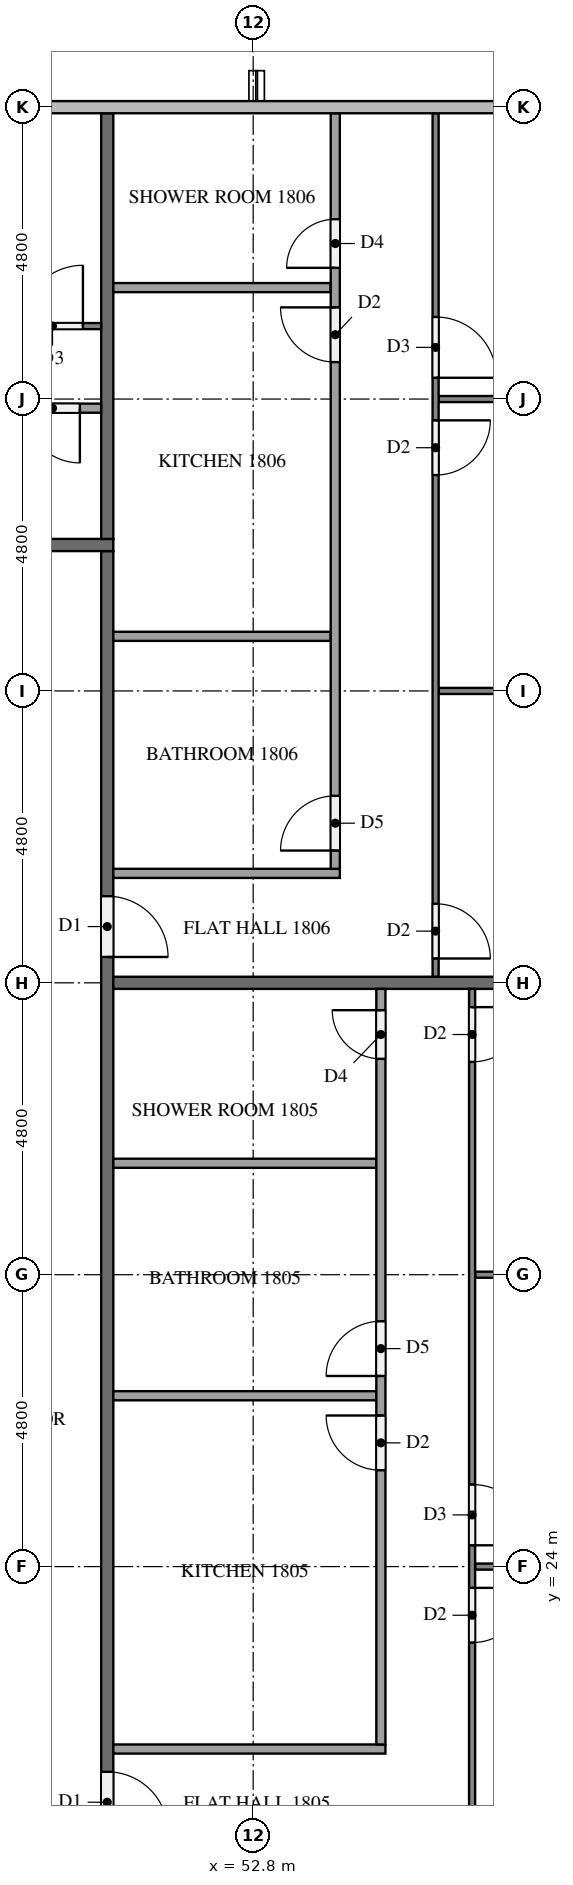
"""IFC4 building model, lengths in metres.
Left out: names, types, materials, properties, quantities, classifications, styles, units other than length and angle.
Written with IfcOpenShell. Run it as: python <this file> out.ifc"""

import sys

from ifc_helpers import new_model, si_unit, direction, frame, frame_2d, origin, place, context, subcontext, project, spatial, rectangle, extrude, element, fill, save


model = new_model("IFC4")
c1 = context("Model", 3, precision=1e-05, world=origin(), true_north=direction((0.0, 1.0)))
c2 = subcontext(c1, "Body", "Model", "MODEL_VIEW")
j1 = project(units=[si_unit("LENGTHUNIT", "METRE"), si_unit("PLANEANGLEUNIT", "RADIAN")], contexts=[c1])
p1 = place(None, origin())
s1 = spatial("IfcSite", under=j1, at=p1, CompositionType="ELEMENT")
p2 = place(p1, origin())
s2 = spatial("IfcBuilding", under=s1, at=p2, CompositionType="ELEMENT")
p3 = place(p2, frame((0.0, 0.0, 73.3)))
s3 = spatial("IfcBuildingStorey", under=s2, at=p3, CompositionType="ELEMENT", Elevation=73.3)
p4 = place(p3, frame((50.4, 40.7, 0.0), z_axis=(0.0, 0.0, 1.0), x_axis=(0.0, -1.0, 0.0)))
e1 = element("IfcWall", 1, at=p4, inside=s3, PredefinedType="PARTITIONING", context=c2, shape_type="SweptSolid", body=[
    extrude(rectangle(XDim=28.6, YDim=0.2, at=frame_2d((14.3, 0.0))), origin(), (0.0, 0.0, 1.0), 3.2),
])
p5 = place(p4, frame((21.875, 0.0, 0.0)))
e2 = element("IfcOpeningElement", 2, at=p5, cuts=e1, PredefinedType="OPENING", context=c2, shape_type="SweptSolid", body=[
    extrude(rectangle(XDim=1.1, YDim=2.1, at=frame_2d((0.55, 1.05))), frame((0.0, 0.11, 0.0), z_axis=(0.0, -1.0, 0.0), x_axis=(1.0, 0.0, 0.0)), (0.0, 0.0, 1.0), 0.22),
])
p6 = place(p4, frame((20.075, 0.0, 0.0)))
e3 = element("IfcOpeningElement", 3, at=p6, cuts=e1, PredefinedType="OPENING", context=c2, shape_type="SweptSolid", body=[
    extrude(rectangle(XDim=1.0, YDim=2.1, at=frame_2d((0.5, 1.05))), frame((0.0, 0.11, 0.0), z_axis=(0.0, -1.0, 0.0), x_axis=(1.0, 0.0, 0.0)), (0.0, 0.0, 1.0), 0.22),
])
p7 = place(p4, frame((5.675, 0.0, 0.0)))
e4 = element("IfcOpeningElement", 4, at=p7, cuts=e1, PredefinedType="OPENING", context=c2, shape_type="SweptSolid", body=[
    extrude(rectangle(XDim=1.0, YDim=2.1, at=frame_2d((0.5, 1.05))), frame((0.0, 0.11, 0.0), z_axis=(0.0, -1.0, 0.0), x_axis=(1.0, 0.0, 0.0)), (0.0, 0.0, 1.0), 0.22),
])
p8 = place(p3, frame((11.9, 40.8, 0.0), z_axis=(0.0, 0.0, 1.0), x_axis=(1.0, 0.0, 0.0)))
e5 = element("IfcWall", 5, at=p8, inside=s3, PredefinedType="PARTITIONING", context=c2, shape_type="SweptSolid", body=[
    extrude(rectangle(XDim=38.6, YDim=0.2, at=frame_2d((19.3, 0.0))), origin(), (0.0, 0.0, 1.0), 3.2),
])
p9 = place(p8, frame((22.125, 0.0, 0.0)))
e6 = element("IfcOpeningElement", 6, at=p9, cuts=e5, PredefinedType="OPENING", context=c2, shape_type="SweptSolid", body=[
    extrude(rectangle(XDim=1.0, YDim=2.1, at=frame_2d((0.5, 1.05))), frame((0.0, 0.11, 0.0), z_axis=(0.0, -1.0, 0.0), x_axis=(1.0, 0.0, 0.0)), (0.0, 0.0, 1.0), 0.22),
])
p10 = place(p8, frame((7.725, 0.0, 0.0)))
e7 = element("IfcOpeningElement", 7, at=p10, cuts=e5, PredefinedType="OPENING", context=c2, shape_type="SweptSolid", body=[
    extrude(rectangle(XDim=1.0, YDim=2.1, at=frame_2d((0.5, 1.05))), frame((0.0, 0.11, 0.0), z_axis=(0.0, -1.0, 0.0), x_axis=(1.0, 0.0, 0.0)), (0.0, 0.0, 1.0), 0.22),
])
p11 = place(p8, frame((5.875, 0.0, 0.0)))
e8 = element("IfcOpeningElement", 8, at=p11, cuts=e5, PredefinedType="OPENING", context=c2, shape_type="SweptSolid", body=[
    extrude(rectangle(XDim=1.0, YDim=2.1, at=frame_2d((0.5, 1.05))), frame((0.0, 0.11, 0.0), z_axis=(0.0, -1.0, 0.0), x_axis=(1.0, 0.0, 0.0)), (0.0, 0.0, 1.0), 0.22),
])
p12 = place(p3, frame((50.5, 33.6, 0.0), z_axis=(0.0, 0.0, 1.0), x_axis=(1.0, 0.0, 0.0)))
e9 = element("IfcWall", 9, at=p12, inside=s3, PredefinedType="PARTITIONING", context=c2, shape_type="SweptSolid", body=[
    extrude(rectangle(XDim=11.475, YDim=0.2, at=frame_2d((5.738, 0.0))), origin(), (0.0, 0.0, 1.0), 3.2),
])
p13 = place(p3, frame((50.4, 40.9, 0.0), z_axis=(0.0, 0.0, 1.0), x_axis=(0.0, 1.0, 0.0)))
e10 = element("IfcWall", 10, at=p13, inside=s3, PredefinedType="PARTITIONING", context=c2, shape_type="SweptSolid", body=[
    extrude(rectangle(XDim=7.0, YDim=0.2, at=frame_2d((3.5, 0.0))), origin(), (0.0, 0.0, 1.0), 3.2),
])
p14 = place(p3, frame((56.45, 24.0, 0.0), z_axis=(0.0, 0.0, 1.0), x_axis=(1.0, 0.0, 0.0)))
e11 = element("IfcWall", 11, at=p14, inside=s3, PredefinedType="PARTITIONING", context=c2, shape_type="SweptSolid", body=[
    extrude(rectangle(XDim=5.525, YDim=0.1, at=frame_2d((2.763, 0.0))), origin(), (0.0, 0.0, 1.0), 3.2),
])
p15 = place(p3, frame((56.45, 28.8, 0.0), z_axis=(0.0, 0.0, 1.0), x_axis=(1.0, 0.0, 0.0)))
e12 = element("IfcWall", 12, at=p15, inside=s3, PredefinedType="PARTITIONING", context=c2, shape_type="SweptSolid", body=[
    extrude(rectangle(XDim=5.85, YDim=0.1, at=frame_2d((2.925, 0.0))), origin(), (0.0, 0.0, 1.0), 3.2),
])
p16 = place(p3, frame((56.4, 33.5, 0.0), z_axis=(0.0, 0.0, 1.0), x_axis=(0.0, -1.0, 0.0)))
e13 = element("IfcWall", 13, at=p16, inside=s3, PredefinedType="PARTITIONING", context=c2, shape_type="SweptSolid", body=[
    extrude(rectangle(XDim=14.2, YDim=0.1, at=frame_2d((7.1, 0.0))), origin(), (0.0, 0.0, 1.0), 3.2),
])
p17 = place(p16, frame((9.85, 0.0, 0.0)))
e14 = element("IfcOpeningElement", 14, at=p17, cuts=e13, PredefinedType="OPENING", context=c2, shape_type="SweptSolid", body=[
    extrude(rectangle(XDim=0.9, YDim=2.1, at=frame_2d((0.45, 1.05))), frame((0.0, 0.06, 0.0), z_axis=(0.0, -1.0, 0.0), x_axis=(1.0, 0.0, 0.0)), (0.0, 0.0, 1.0), 0.12),
])
p18 = place(p16, frame((8.15, 0.0, 0.0)))
e15 = element("IfcOpeningElement", 15, at=p18, cuts=e13, PredefinedType="OPENING", context=c2, shape_type="SweptSolid", body=[
    extrude(rectangle(XDim=1.0, YDim=2.1, at=frame_2d((0.5, 1.05))), frame((0.0, 0.06, 0.0), z_axis=(0.0, -1.0, 0.0), x_axis=(1.0, 0.0, 0.0)), (0.0, 0.0, 1.0), 0.12),
])
p19 = place(p16, frame((0.3, 0.0, 0.0)))
e16 = element("IfcOpeningElement", 16, at=p19, cuts=e13, PredefinedType="OPENING", context=c2, shape_type="SweptSolid", body=[
    extrude(rectangle(XDim=0.9, YDim=2.1, at=frame_2d((0.45, 1.05))), frame((0.0, 0.06, 0.0), z_axis=(0.0, -1.0, 0.0), x_axis=(1.0, 0.0, 0.0)), (0.0, 0.0, 1.0), 0.12),
])
for number, where, z_axis, x_axis in (
    (17, (50.5, 26.81, 0.0), (0.0, 0.0, 1.0), (1.0, 0.0, 0.0)),
    (18, (50.5, 30.633, 0.0), (0.0, 0.0, 1.0), (1.0, 0.0, 0.0)),
):
    element("IfcWall", number, at=place(p3, frame(where, z_axis=z_axis, x_axis=x_axis)), inside=s3, PredefinedType="PARTITIONING", context=c2, shape_type="SweptSolid", body=[
        extrude(rectangle(XDim=4.325, YDim=0.15, at=frame_2d((2.163, 0.0))), origin(), (0.0, 0.0, 1.0), 3.2),
    ])
p20 = place(p3, frame((50.5, 21.0, 0.0), z_axis=(0.0, 0.0, 1.0), x_axis=(1.0, 0.0, 0.0)))
e19 = element("IfcWall", 19, at=p20, inside=s3, PredefinedType="PARTITIONING", context=c2, shape_type="SweptSolid", body=[
    extrude(rectangle(XDim=4.475, YDim=0.15, at=frame_2d((2.238, 0.0))), origin(), (0.0, 0.0, 1.0), 3.2),
])
p21 = place(p3, frame((54.9, 21.075, 0.0), z_axis=(0.0, 0.0, 1.0), x_axis=(0.0, 1.0, 0.0)))
e20 = element("IfcWall", 20, at=p21, inside=s3, PredefinedType="PARTITIONING", context=c2, shape_type="SweptSolid", body=[
    extrude(rectangle(XDim=12.425, YDim=0.15, at=frame_2d((6.212, 0.0))), origin(), (0.0, 0.0, 1.0), 3.2),
])
p22 = place(p21, frame((4.51, 0.0, 0.0)))
e21 = element("IfcOpeningElement", 21, at=p22, cuts=e20, PredefinedType="OPENING", context=c2, shape_type="SweptSolid", body=[
    extrude(rectangle(XDim=0.9, YDim=2.1, at=frame_2d((0.45, 1.05))), frame((0.0, 0.085, 0.0), z_axis=(0.0, -1.0, 0.0), x_axis=(1.0, 0.0, 0.0)), (0.0, 0.0, 1.0), 0.17),
])
p23 = place(p21, frame((6.06, 0.0, 0.0)))
e22 = element("IfcOpeningElement", 22, at=p23, cuts=e20, PredefinedType="OPENING", context=c2, shape_type="SweptSolid", body=[
    extrude(rectangle(XDim=0.9, YDim=2.1, at=frame_2d((0.45, 1.05))), frame((0.0, 0.085, 0.0), z_axis=(0.0, -1.0, 0.0), x_axis=(1.0, 0.0, 0.0)), (0.0, 0.0, 1.0), 0.17),
])
p24 = place(p21, frame((11.275, 0.0, 0.0)))
e23 = element("IfcOpeningElement", 23, at=p24, cuts=e20, PredefinedType="OPENING", context=c2, shape_type="SweptSolid", body=[
    extrude(rectangle(XDim=0.8, YDim=2.1, at=frame_2d((0.4, 1.05))), frame((0.0, 0.085, 0.0), z_axis=(0.0, -1.0, 0.0), x_axis=(1.0, 0.0, 0.0)), (0.0, 0.0, 1.0), 0.17),
])
p25 = place(p3, frame((55.85, 38.4, 0.0), z_axis=(0.0, 0.0, 1.0), x_axis=(1.0, 0.0, 0.0)))
e24 = element("IfcWall", 24, at=p25, inside=s3, PredefinedType="PARTITIONING", context=c2, shape_type="SweptSolid", body=[
    extrude(rectangle(XDim=6.45, YDim=0.1, at=frame_2d((3.225, 0.0))), origin(), (0.0, 0.0, 1.0), 3.2),
])
p26 = place(p3, frame((55.85, 43.2, 0.0), z_axis=(0.0, 0.0, 1.0), x_axis=(1.0, 0.0, 0.0)))
e25 = element("IfcWall", 25, at=p26, inside=s3, PredefinedType="PARTITIONING", context=c2, shape_type="SweptSolid", body=[
    extrude(rectangle(XDim=5.975, YDim=0.1, at=frame_2d((2.987, 0.0))), origin(), (0.0, 0.0, 1.0), 3.2),
])
p27 = place(p3, frame((55.8, 47.9, 0.0), z_axis=(0.0, 0.0, 1.0), x_axis=(0.0, -1.0, 0.0)))
e26 = element("IfcWall", 26, at=p27, inside=s3, PredefinedType="PARTITIONING", context=c2, shape_type="SweptSolid", body=[
    extrude(rectangle(XDim=14.2, YDim=0.1, at=frame_2d((7.1, 0.0))), origin(), (0.0, 0.0, 1.0), 3.2),
])
p28 = place(p27, frame((13.0, 0.0, 0.0)))
e27 = element("IfcOpeningElement", 27, at=p28, cuts=e26, PredefinedType="OPENING", context=c2, shape_type="SweptSolid", body=[
    extrude(rectangle(XDim=0.9, YDim=2.1, at=frame_2d((0.45, 1.05))), frame((0.0, 0.06, 0.0), z_axis=(0.0, -1.0, 0.0), x_axis=(1.0, 0.0, 0.0)), (0.0, 0.0, 1.0), 0.12),
])
p29 = place(p27, frame((5.05, 0.0, 0.0)))
e28 = element("IfcOpeningElement", 28, at=p29, cuts=e26, PredefinedType="OPENING", context=c2, shape_type="SweptSolid", body=[
    extrude(rectangle(XDim=0.9, YDim=2.1, at=frame_2d((0.45, 1.05))), frame((0.0, 0.06, 0.0), z_axis=(0.0, -1.0, 0.0), x_axis=(1.0, 0.0, 0.0)), (0.0, 0.0, 1.0), 0.12),
])
p30 = place(p27, frame((3.35, 0.0, 0.0)))
e29 = element("IfcOpeningElement", 29, at=p30, cuts=e26, PredefinedType="OPENING", context=c2, shape_type="SweptSolid", body=[
    extrude(rectangle(XDim=1.0, YDim=2.1, at=frame_2d((0.5, 1.05))), frame((0.0, 0.06, 0.0), z_axis=(0.0, -1.0, 0.0), x_axis=(1.0, 0.0, 0.0)), (0.0, 0.0, 1.0), 0.12),
])
for number, where, z_axis, x_axis in (
    (30, (50.5, 39.298, 0.0), (0.0, 0.0, 1.0), (1.0, 0.0, 0.0)),
    (31, (50.5, 45.033, 0.0), (0.0, 0.0, 1.0), (1.0, 0.0, 0.0)),
):
    element("IfcWall", number, at=place(p3, frame(where, z_axis=z_axis, x_axis=x_axis)), inside=s3, PredefinedType="PARTITIONING", context=c2, shape_type="SweptSolid", body=[
        extrude(rectangle(XDim=3.575, YDim=0.15, at=frame_2d((1.788, 0.0))), origin(), (0.0, 0.0, 1.0), 3.2),
    ])
p31 = place(p3, frame((50.5, 35.4, 0.0), z_axis=(0.0, 0.0, 1.0), x_axis=(1.0, 0.0, 0.0)))
e32 = element("IfcWall", 32, at=p31, inside=s3, PredefinedType="PARTITIONING", context=c2, shape_type="SweptSolid", body=[
    extrude(rectangle(XDim=3.725, YDim=0.15, at=frame_2d((1.863, 0.0))), origin(), (0.0, 0.0, 1.0), 3.2),
])
p32 = place(p3, frame((54.15, 35.475, 0.0), z_axis=(0.0, 0.0, 1.0), x_axis=(0.0, 1.0, 0.0)))
e33 = element("IfcWall", 33, at=p32, inside=s3, PredefinedType="PARTITIONING", context=c2, shape_type="SweptSolid", body=[
    extrude(rectangle(XDim=12.425, YDim=0.15, at=frame_2d((6.212, 0.0))), origin(), (0.0, 0.0, 1.0), 3.2),
])
p33 = place(p32, frame((0.3, 0.0, 0.0)))
e34 = element("IfcOpeningElement", 34, at=p33, cuts=e33, PredefinedType="OPENING", context=c2, shape_type="SweptSolid", body=[
    extrude(rectangle(XDim=0.9, YDim=2.1, at=frame_2d((0.45, 1.05))), frame((0.0, 0.085, 0.0), z_axis=(0.0, -1.0, 0.0), x_axis=(1.0, 0.0, 0.0)), (0.0, 0.0, 1.0), 0.17),
])
p34 = place(p32, frame((8.333, 0.0, 0.0)))
e35 = element("IfcOpeningElement", 35, at=p34, cuts=e33, PredefinedType="OPENING", context=c2, shape_type="SweptSolid", body=[
    extrude(rectangle(XDim=0.9, YDim=2.1, at=frame_2d((0.45, 1.05))), frame((0.0, 0.085, 0.0), z_axis=(0.0, -1.0, 0.0), x_axis=(1.0, 0.0, 0.0)), (0.0, 0.0, 1.0), 0.17),
])
p35 = place(p32, frame((9.883, 0.0, 0.0)))
e36 = element("IfcOpeningElement", 36, at=p35, cuts=e33, PredefinedType="OPENING", context=c2, shape_type="SweptSolid", body=[
    extrude(rectangle(XDim=0.8, YDim=2.1, at=frame_2d((0.4, 1.05))), frame((0.0, 0.085, 0.0), z_axis=(0.0, -1.0, 0.0), x_axis=(1.0, 0.0, 0.0)), (0.0, 0.0, 1.0), 0.17),
])
p36 = place(p3, frame((33.7, 44.4, 0.0), z_axis=(0.0, 0.0, 1.0), x_axis=(1.0, 0.0, 0.0)))
e37 = element("IfcWall", 37, at=p36, inside=s3, PredefinedType="PARTITIONING", context=c2, shape_type="SweptSolid", body=[
    extrude(rectangle(XDim=16.6, YDim=0.1, at=frame_2d((8.3, 0.0))), origin(), (0.0, 0.0, 1.0), 3.2),
])
p37 = place(p36, frame((3.45, 0.0, 0.0)))
e38 = element("IfcOpeningElement", 38, at=p37, cuts=e37, PredefinedType="OPENING", context=c2, shape_type="SweptSolid", body=[
    extrude(rectangle(XDim=0.9, YDim=2.1, at=frame_2d((0.45, 1.05))), frame((0.0, 0.06, 0.0), z_axis=(0.0, -1.0, 0.0), x_axis=(1.0, 0.0, 0.0)), (0.0, 0.0, 1.0), 0.12),
])
p38 = place(p36, frame((5.05, 0.0, 0.0)))
e39 = element("IfcOpeningElement", 39, at=p38, cuts=e37, PredefinedType="OPENING", context=c2, shape_type="SweptSolid", body=[
    extrude(rectangle(XDim=0.9, YDim=2.1, at=frame_2d((0.45, 1.05))), frame((0.0, 0.06, 0.0), z_axis=(0.0, -1.0, 0.0), x_axis=(1.0, 0.0, 0.0)), (0.0, 0.0, 1.0), 0.12),
])
p39 = place(p36, frame((15.3, 0.0, 0.0)))
e40 = element("IfcOpeningElement", 40, at=p39, cuts=e37, PredefinedType="OPENING", context=c2, shape_type="SweptSolid", body=[
    extrude(rectangle(XDim=1.0, YDim=2.1, at=frame_2d((0.5, 1.05))), frame((0.0, 0.06, 0.0), z_axis=(0.0, -1.0, 0.0), x_axis=(1.0, 0.0, 0.0)), (0.0, 0.0, 1.0), 0.12),
])
p40 = place(p3, frame((50.3, 43.05, 0.0), z_axis=(0.0, 0.0, 1.0), x_axis=(-1.0, 0.0, 0.0)))
e41 = element("IfcWall", 41, at=p40, inside=s3, PredefinedType="PARTITIONING", context=c2, shape_type="SweptSolid", body=[
    extrude(rectangle(XDim=14.825, YDim=0.15, at=frame_2d((7.413, 0.0))), origin(), (0.0, 0.0, 1.0), 3.2),
])
p41 = place(p40, frame((11.729, 0.0, 0.0)))
e42 = element("IfcOpeningElement", 42, at=p41, cuts=e41, PredefinedType="OPENING", context=c2, shape_type="SweptSolid", body=[
    extrude(rectangle(XDim=0.8, YDim=2.1, at=frame_2d((0.4, 1.05))), frame((0.0, 0.085, 0.0), z_axis=(0.0, -1.0, 0.0), x_axis=(1.0, 0.0, 0.0)), (0.0, 0.0, 1.0), 0.17),
])
p42 = place(p40, frame((10.179, 0.0, 0.0)))
e43 = element("IfcOpeningElement", 43, at=p42, cuts=e41, PredefinedType="OPENING", context=c2, shape_type="SweptSolid", body=[
    extrude(rectangle(XDim=0.9, YDim=2.1, at=frame_2d((0.45, 1.05))), frame((0.0, 0.085, 0.0), z_axis=(0.0, -1.0, 0.0), x_axis=(1.0, 0.0, 0.0)), (0.0, 0.0, 1.0), 0.17),
])
p43 = place(p40, frame((0.35, 0.0, 0.0)))
e44 = element("IfcOpeningElement", 44, at=p43, cuts=e41, PredefinedType="OPENING", context=c2, shape_type="SweptSolid", body=[
    extrude(rectangle(XDim=0.9, YDim=2.1, at=frame_2d((0.45, 1.05))), frame((0.0, 0.085, 0.0), z_axis=(0.0, -1.0, 0.0), x_axis=(1.0, 0.0, 0.0)), (0.0, 0.0, 1.0), 0.17),
])
p44 = place(p6, origin())
e45 = element("IfcDoor", 45, at=p44, inside=s3, OperationType="SINGLE_SWING_RIGHT", PredefinedType="DOOR", context=c2, shape_type="SweptSolid", body=[
    extrude(rectangle(XDim=1.0, YDim=2.1, at=frame_2d((0.5, 1.05))), frame((0.0, 0.025, 0.0), z_axis=(0.0, -1.0, 0.0), x_axis=(1.0, 0.0, 0.0)), (0.0, 0.0, 1.0), 0.05),
])
fill(e3, e45)
p45 = place(p7, origin())
e46 = element("IfcDoor", 46, at=p45, inside=s3, OperationType="SINGLE_SWING_RIGHT", PredefinedType="DOOR", context=c2, shape_type="SweptSolid", body=[
    extrude(rectangle(XDim=1.0, YDim=2.1, at=frame_2d((0.5, 1.05))), frame((0.0, 0.025, 0.0), z_axis=(0.0, -1.0, 0.0), x_axis=(1.0, 0.0, 0.0)), (0.0, 0.0, 1.0), 0.05),
])
fill(e4, e46)
p46 = place(p17, origin())
e47 = element("IfcDoor", 47, at=p46, inside=s3, OperationType="SINGLE_SWING_LEFT", PredefinedType="DOOR", context=c2, shape_type="SweptSolid", body=[
    extrude(rectangle(XDim=0.9, YDim=2.1, at=frame_2d((0.45, 1.05))), frame((0.0, 0.025, 0.0), z_axis=(0.0, -1.0, 0.0), x_axis=(1.0, 0.0, 0.0)), (0.0, 0.0, 1.0), 0.05),
])
fill(e14, e47)
p47 = place(p18, origin())
e48 = element("IfcDoor", 48, at=p47, inside=s3, OperationType="SINGLE_SWING_RIGHT", PredefinedType="DOOR", context=c2, shape_type="SweptSolid", body=[
    extrude(rectangle(XDim=1.0, YDim=2.1, at=frame_2d((0.5, 1.05))), frame((0.0, 0.025, 0.0), z_axis=(0.0, -1.0, 0.0), x_axis=(1.0, 0.0, 0.0)), (0.0, 0.0, 1.0), 0.05),
])
fill(e15, e48)
p48 = place(p19, origin())
e49 = element("IfcDoor", 49, at=p48, inside=s3, OperationType="SINGLE_SWING_LEFT", PredefinedType="DOOR", context=c2, shape_type="SweptSolid", body=[
    extrude(rectangle(XDim=0.9, YDim=2.1, at=frame_2d((0.45, 1.05))), frame((0.0, 0.025, 0.0), z_axis=(0.0, -1.0, 0.0), x_axis=(1.0, 0.0, 0.0)), (0.0, 0.0, 1.0), 0.05),
])
fill(e16, e49)
p49 = place(p22, origin())
e50 = element("IfcDoor", 50, at=p49, inside=s3, OperationType="SINGLE_SWING_RIGHT", PredefinedType="DOOR", context=c2, shape_type="SweptSolid", body=[
    extrude(rectangle(XDim=0.9, YDim=2.1, at=frame_2d((0.45, 1.05))), frame((0.0, 0.025, 0.0), z_axis=(0.0, -1.0, 0.0), x_axis=(1.0, 0.0, 0.0)), (0.0, 0.0, 1.0), 0.05),
])
fill(e21, e50)
p50 = place(p23, origin())
e51 = element("IfcDoor", 51, at=p50, inside=s3, OperationType="SINGLE_SWING_LEFT", PredefinedType="DOOR", context=c2, shape_type="SweptSolid", body=[
    extrude(rectangle(XDim=0.9, YDim=2.1, at=frame_2d((0.45, 1.05))), frame((0.0, 0.025, 0.0), z_axis=(0.0, -1.0, 0.0), x_axis=(1.0, 0.0, 0.0)), (0.0, 0.0, 1.0), 0.05),
])
fill(e22, e51)
p51 = place(p24, origin())
e52 = element("IfcDoor", 52, at=p51, inside=s3, OperationType="SINGLE_SWING_RIGHT", PredefinedType="DOOR", context=c2, shape_type="SweptSolid", body=[
    extrude(rectangle(XDim=0.8, YDim=2.1, at=frame_2d((0.4, 1.05))), frame((0.0, 0.025, 0.0), z_axis=(0.0, -1.0, 0.0), x_axis=(1.0, 0.0, 0.0)), (0.0, 0.0, 1.0), 0.05),
])
fill(e23, e52)
p52 = place(p28, origin())
e53 = element("IfcDoor", 53, at=p52, inside=s3, OperationType="SINGLE_SWING_RIGHT", PredefinedType="DOOR", context=c2, shape_type="SweptSolid", body=[
    extrude(rectangle(XDim=0.9, YDim=2.1, at=frame_2d((0.45, 1.05))), frame((0.0, 0.025, 0.0), z_axis=(0.0, -1.0, 0.0), x_axis=(1.0, 0.0, 0.0)), (0.0, 0.0, 1.0), 0.05),
])
fill(e27, e53)
p53 = place(p29, origin())
e54 = element("IfcDoor", 54, at=p53, inside=s3, OperationType="SINGLE_SWING_LEFT", PredefinedType="DOOR", context=c2, shape_type="SweptSolid", body=[
    extrude(rectangle(XDim=0.9, YDim=2.1, at=frame_2d((0.45, 1.05))), frame((0.0, 0.025, 0.0), z_axis=(0.0, -1.0, 0.0), x_axis=(1.0, 0.0, 0.0)), (0.0, 0.0, 1.0), 0.05),
])
fill(e28, e54)
p54 = place(p30, origin())
e55 = element("IfcDoor", 55, at=p54, inside=s3, OperationType="SINGLE_SWING_RIGHT", PredefinedType="DOOR", context=c2, shape_type="SweptSolid", body=[
    extrude(rectangle(XDim=1.0, YDim=2.1, at=frame_2d((0.5, 1.05))), frame((0.0, 0.025, 0.0), z_axis=(0.0, -1.0, 0.0), x_axis=(1.0, 0.0, 0.0)), (0.0, 0.0, 1.0), 0.05),
])
fill(e29, e55)
p55 = place(p33, origin())
e56 = element("IfcDoor", 56, at=p55, inside=s3, OperationType="SINGLE_SWING_LEFT", PredefinedType="DOOR", context=c2, shape_type="SweptSolid", body=[
    extrude(rectangle(XDim=0.9, YDim=2.1, at=frame_2d((0.45, 1.05))), frame((0.0, 0.025, 0.0), z_axis=(0.0, -1.0, 0.0), x_axis=(1.0, 0.0, 0.0)), (0.0, 0.0, 1.0), 0.05),
])
fill(e34, e56)
p56 = place(p34, origin())
e57 = element("IfcDoor", 57, at=p56, inside=s3, OperationType="SINGLE_SWING_RIGHT", PredefinedType="DOOR", context=c2, shape_type="SweptSolid", body=[
    extrude(rectangle(XDim=0.9, YDim=2.1, at=frame_2d((0.45, 1.05))), frame((0.0, 0.025, 0.0), z_axis=(0.0, -1.0, 0.0), x_axis=(1.0, 0.0, 0.0)), (0.0, 0.0, 1.0), 0.05),
])
fill(e35, e57)
p57 = place(p35, origin())
e58 = element("IfcDoor", 58, at=p57, inside=s3, OperationType="SINGLE_SWING_LEFT", PredefinedType="DOOR", context=c2, shape_type="SweptSolid", body=[
    extrude(rectangle(XDim=0.8, YDim=2.1, at=frame_2d((0.4, 1.05))), frame((0.0, 0.025, 0.0), z_axis=(0.0, -1.0, 0.0), x_axis=(1.0, 0.0, 0.0)), (0.0, 0.0, 1.0), 0.05),
])
fill(e36, e58)
p58 = place(p39, origin())
e59 = element("IfcDoor", 59, at=p58, inside=s3, OperationType="SINGLE_SWING_RIGHT", PredefinedType="DOOR", context=c2, shape_type="SweptSolid", body=[
    extrude(rectangle(XDim=1.0, YDim=2.1, at=frame_2d((0.5, 1.05))), frame((0.0, 0.025, 0.0), z_axis=(0.0, -1.0, 0.0), x_axis=(1.0, 0.0, 0.0)), (0.0, 0.0, 1.0), 0.05),
])
fill(e40, e59)
p59 = place(p43, origin())
e60 = element("IfcDoor", 60, at=p59, inside=s3, OperationType="SINGLE_SWING_LEFT", PredefinedType="DOOR", context=c2, shape_type="SweptSolid", body=[
    extrude(rectangle(XDim=0.9, YDim=2.1, at=frame_2d((0.45, 1.05))), frame((0.0, 0.025, 0.0), z_axis=(0.0, -1.0, 0.0), x_axis=(1.0, 0.0, 0.0)), (0.0, 0.0, 1.0), 0.05),
])
fill(e44, e60)
save(model, sys.argv[1])
